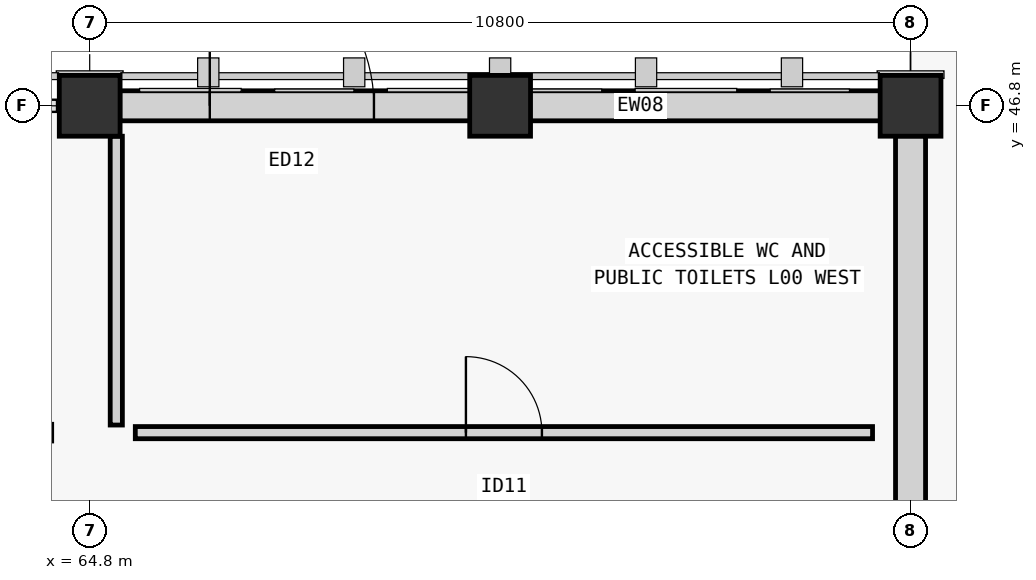
"""IFC4 building model, lengths in metres.
Left out: names, types, materials, properties, quantities, classifications, styles, units other than length and angle.
Written with IfcOpenShell. Run it as: python <this file> out.ifc"""

import sys

from ifc_helpers import new_model, si_unit, direction, frame, frame_2d, origin, origin_2d, place, context, subcontext, project, spatial, rectangle, extrude, element, fill, save


model = new_model("IFC4")
c1 = context("Model", 3, precision=1e-05, world=origin(), true_north=direction((0.0, 1.0)))
c2 = subcontext(c1, "Body", "Model", "MODEL_VIEW")
j1 = project(units=[si_unit("LENGTHUNIT", "METRE"), si_unit("PLANEANGLEUNIT", "RADIAN")], contexts=[c1])
p1 = place(None, origin())
s1 = spatial("IfcSite", under=j1, at=p1, CompositionType="ELEMENT")
p2 = place(p1, origin())
s2 = spatial("IfcBuilding", under=s1, at=p2, CompositionType="ELEMENT")
p3 = place(p2, origin())
s3 = spatial("IfcBuildingStorey", under=s2, at=p3, CompositionType="ELEMENT", Elevation=0.0)
for number, where, z_axis, x_axis in (
    (1, (64.8, 46.8, -0.3), (0.0, 0.0, 1.0), (1.0, 0.0, 0.0)),
    (2, (75.6, 46.8, -0.3), (0.0, 0.0, 1.0), (1.0, 0.0, 0.0)),
    (3, (70.2, 46.8, -0.3), (0.0, 0.0, 1.0), (1.0, 0.0, 0.0)),
):
    element("IfcColumn", number, at=place(p3, frame(where, z_axis=z_axis, x_axis=x_axis)), inside=s3, PredefinedType="COLUMN", context=c2, shape_type="SweptSolid", body=[
        extrude(rectangle(XDim=0.8, YDim=0.8, at=origin_2d()), origin(), (0.0, 0.0, 1.0), 5.7),
    ])
p4 = place(p3, frame((65.196, 46.8, 0.0), z_axis=(0.0, 0.0, 1.0), x_axis=(1.0, 0.0, 0.0)))
e4 = element("IfcWall", 4, at=p4, inside=s3, PredefinedType="STANDARD", context=c2, shape_type="SweptSolid", body=[
    extrude(rectangle(XDim=10.008, YDim=0.395, at=frame_2d((5.004, 0.0))), origin(), (0.0, 0.0, 1.0), 4.405),
])
p5 = place(p4, frame((1.184, 0.0, 0.0)))
e5 = element("IfcOpeningElement", 5, at=p5, cuts=e4, PredefinedType="OPENING", context=c2, shape_type="SweptSolid", body=[
    extrude(rectangle(XDim=2.16, YDim=2.38, at=frame_2d((1.08, 1.19))), frame((0.0, 0.198, 0.0), z_axis=(0.0, -1.0, 0.0), x_axis=(1.0, 0.0, 0.0)), (0.0, 0.0, 1.0), 0.395),
])
p6 = place(p3, frame((75.6, 46.404, 0.0), z_axis=(0.0, 0.0, 1.0), x_axis=(0.0, -1.0, 0.0)))
e6 = element("IfcWall", 6, at=p6, inside=s3, PredefinedType="STANDARD", context=c2, shape_type="SweptSolid", body=[
    extrude(rectangle(XDim=6.408, YDim=0.395, at=frame_2d((3.204, 0.0))), origin(), (0.0, 0.0, 1.0), 4.495),
])
p7 = place(p3, frame((48.4, 42.5, 0.0), z_axis=(0.0, 0.0, 1.0), x_axis=(1.0, 0.0, 0.0)))
e7 = element("IfcWall", 7, at=p7, inside=s3, PredefinedType="STANDARD", context=c2, shape_type="SweptSolid", body=[
    extrude(rectangle(XDim=15.9, YDim=0.22, at=frame_2d((7.95, 0.0))), origin(), (0.0, 0.0, 1.0), 4.2),
])
p8 = place(p7, frame((7.1, 0.0, 0.0)))
e8 = element("IfcOpeningElement", 8, at=p8, cuts=e7, PredefinedType="OPENING", context=c2, shape_type="SweptSolid", body=[
    extrude(rectangle(XDim=1.7, YDim=2.26, at=frame_2d((0.85, 1.13))), frame((0.0, 0.11, 0.0), z_axis=(0.0, -1.0, 0.0), x_axis=(1.0, 0.0, 0.0)), (0.0, 0.0, 1.0), 0.22),
])
p9 = place(p3, frame((65.4, 42.5, 0.0), z_axis=(0.0, 0.0, 1.0), x_axis=(1.0, 0.0, 0.0)))
e9 = element("IfcWall", 9, at=p9, inside=s3, PredefinedType="PLUMBINGWALL", context=c2, shape_type="SweptSolid", body=[
    extrude(rectangle(XDim=9.7, YDim=0.16, at=frame_2d((4.85, 0.0))), origin(), (0.0, 0.0, 1.0), 4.2),
])
p10 = place(p9, frame((4.35, 0.0, 0.0)))
e10 = element("IfcOpeningElement", 10, at=p10, cuts=e9, PredefinedType="OPENING", context=c2, shape_type="SweptSolid", body=[
    extrude(rectangle(XDim=1.0, YDim=2.15, at=frame_2d((0.5, 1.075))), frame((0.0, 0.08, 0.0), z_axis=(0.0, -1.0, 0.0), x_axis=(1.0, 0.0, 0.0)), (0.0, 0.0, 1.0), 0.16),
])
p11 = place(p3, frame((65.15, 42.6, 0.0), z_axis=(0.0, 0.0, 1.0), x_axis=(0.0, 1.0, 0.0)))
e11 = element("IfcWall", 11, at=p11, inside=s3, PredefinedType="PLUMBINGWALL", context=c2, shape_type="SweptSolid", body=[
    extrude(rectangle(XDim=3.8, YDim=0.16, at=frame_2d((1.9, 0.0))), origin(), (0.0, 0.0, 1.0), 4.2),
])
p12 = place(p5, origin())
e12 = element("IfcDoor", 12, at=p12, inside=s3, OperationType="SINGLE_SWING_LEFT", PredefinedType="DOOR", context=c2, shape_type="SweptSolid", body=[
    extrude(rectangle(XDim=2.16, YDim=2.38, at=frame_2d((1.08, 1.19))), frame((0.0, 0.025, 0.0), z_axis=(0.0, -1.0, 0.0), x_axis=(1.0, 0.0, 0.0)), (0.0, 0.0, 1.0), 0.05),
])
fill(e5, e12)
p13 = place(p10, origin())
e13 = element("IfcDoor", 13, at=p13, inside=s3, OperationType="SINGLE_SWING_LEFT", PredefinedType="DOOR", context=c2, shape_type="SweptSolid", body=[
    extrude(rectangle(XDim=1.0, YDim=2.15, at=frame_2d((0.5, 1.075))), frame((0.0, 0.025, 0.0), z_axis=(0.0, -1.0, 0.0), x_axis=(1.0, 0.0, 0.0)), (0.0, 0.0, 1.0), 0.05),
])
fill(e10, e13)
save(model, sys.argv[1])
